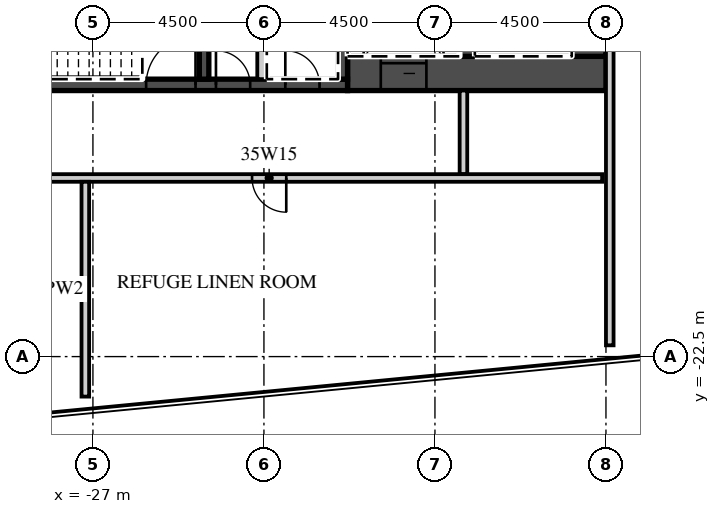
"""IFC4 building model, lengths in metres.
Left out: names, types, materials, properties, quantities, classifications, styles, units other than length and angle.
Written with IfcOpenShell. Run it as: python <this file> out.ifc"""

import sys

from ifc_helpers import new_model, si_unit, direction, frame, frame_2d, origin, place, context, subcontext, project, spatial, rectangle, extrude, element, fill, save


model = new_model("IFC4")
c1 = context("Model", 3, precision=1e-05, world=origin(), true_north=direction((0.0, 1.0)))
c2 = subcontext(c1, "Body", "Model", "MODEL_VIEW")
j1 = project(units=[si_unit("LENGTHUNIT", "METRE"), si_unit("PLANEANGLEUNIT", "RADIAN")], contexts=[c1])
p1 = place(None, origin())
s1 = spatial("IfcSite", under=j1, at=p1, CompositionType="ELEMENT")
p2 = place(p1, origin())
s2 = spatial("IfcBuilding", under=s1, at=p2, CompositionType="ELEMENT")
p3 = place(p2, frame((0.0, 0.0, 150.4)))
s3 = spatial("IfcBuildingStorey", under=s2, at=p3, CompositionType="ELEMENT", Elevation=150.4)
p4 = place(p3, frame((-20.3, -15.05, 0.0), z_axis=(0.0, 0.0, 1.0), x_axis=(1.0, 0.0, 0.0)))
e1 = element("IfcWall", 1, at=p4, inside=s3, PredefinedType="SHEAR", context=c2, shape_type="SweptSolid", body=[
    extrude(rectangle(XDim=6.8, YDim=0.9, at=frame_2d((3.4, 0.0))), origin(), (0.0, 0.0, 1.0), 4.2),
])
p5 = place(p4, frame((0.875, 0.0, 0.0)))
e2 = element("IfcOpeningElement", 2, at=p5, cuts=e1, PredefinedType="OPENING", context=c2, shape_type="SweptSolid", body=[
    extrude(rectangle(XDim=1.2, YDim=2.1, at=frame_2d((0.6, 1.05))), frame((0.0, 0.46, 0.0), z_axis=(0.0, -1.0, 0.0), x_axis=(1.0, 0.0, 0.0)), (0.0, 0.0, 1.0), 0.92),
])
p6 = place(p3, frame((-30.6, -15.35, 0.0), z_axis=(0.0, 0.0, 1.0), x_axis=(1.0, 0.0, 0.0)))
e3 = element("IfcWall", 3, at=p6, inside=s3, PredefinedType="SHEAR", context=c2, shape_type="SweptSolid", body=[
    extrude(rectangle(XDim=10.3, YDim=0.3, at=frame_2d((5.15, 0.0))), origin(), (0.0, 0.0, 1.0), 4.2),
])
p7 = place(p6, frame((5.0, 0.0, 0.0)))
e4 = element("IfcOpeningElement", 4, at=p7, cuts=e3, PredefinedType="OPENING", context=c2, shape_type="SweptSolid", body=[
    extrude(rectangle(XDim=1.3, YDim=2.1, at=frame_2d((0.65, 1.05))), frame((0.0, 0.16, 0.0), z_axis=(0.0, -1.0, 0.0), x_axis=(1.0, 0.0, 0.0)), (0.0, 0.0, 1.0), 0.32),
])
p8 = place(p6, frame((6.837, 0.0, 0.0)))
e5 = element("IfcOpeningElement", 5, at=p8, cuts=e3, PredefinedType="OPENING", context=c2, shape_type="SweptSolid", body=[
    extrude(rectangle(XDim=0.9, YDim=2.1, at=frame_2d((0.45, 1.05))), frame((0.0, 0.16, 0.0), z_axis=(0.0, -1.0, 0.0), x_axis=(1.0, 0.0, 0.0)), (0.0, 0.0, 1.0), 0.32),
])
p9 = place(p6, frame((8.663, 0.0, 0.0)))
e6 = element("IfcOpeningElement", 6, at=p9, cuts=e3, PredefinedType="OPENING", context=c2, shape_type="SweptSolid", body=[
    extrude(rectangle(XDim=0.9, YDim=2.1, at=frame_2d((0.45, 1.05))), frame((0.0, 0.16, 0.0), z_axis=(0.0, -1.0, 0.0), x_axis=(1.0, 0.0, 0.0)), (0.0, 0.0, 1.0), 0.32),
])
p10 = place(p3, frame((-13.95, -14.6, 0.0), z_axis=(0.0, 0.0, 1.0), x_axis=(0.0, 1.0, 0.0)))
e7 = element("IfcWall", 7, at=p10, inside=s3, PredefinedType="SHEAR", context=c2, shape_type="SweptSolid", body=[
    extrude(rectangle(XDim=12.2, YDim=0.9, at=frame_2d((6.1, 0.0))), origin(), (0.0, 0.0, 1.0), 4.2),
])
p11 = place(p3, frame((-17.15, -14.6, 0.0), z_axis=(0.0, 0.0, 1.0), x_axis=(0.0, 1.0, 0.0)))
e8 = element("IfcWall", 8, at=p11, inside=s3, PredefinedType="SHEAR", context=c2, shape_type="SweptSolid", body=[
    extrude(rectangle(XDim=5.8, YDim=0.4, at=frame_2d((2.9, 0.0))), origin(), (0.0, 0.0, 1.0), 4.2),
])
for number, where, z_axis, x_axis in (
    (9, (-20.425, -15.2, 0.0), (0.0, 0.0, 1.0), (0.0, 1.0, 0.0)),
    (10, (-24.075, -15.2, 0.0), (0.0, 0.0, 1.0), (0.0, 1.0, 0.0)),
):
    element("IfcWall", number, at=place(p3, frame(where, z_axis=z_axis, x_axis=x_axis)), inside=s3, PredefinedType="SHEAR", context=c2, shape_type="SweptSolid", body=[
        extrude(rectangle(XDim=3.25, YDim=0.25, at=frame_2d((1.625, 0.0))), origin(), (0.0, 0.0, 1.0), 4.2),
    ])
p12 = place(p3, frame((-22.55, -15.2, 0.0), z_axis=(0.0, 0.0, 1.0), x_axis=(0.0, 1.0, 0.0)))
e11 = element("IfcWall", 11, at=p12, inside=s3, PredefinedType="PARTITIONING", context=c2, shape_type="SweptSolid", body=[
    extrude(rectangle(XDim=3.25, YDim=0.25, at=frame_2d((1.625, 0.0))), origin(), (0.0, 0.0, 1.0), 4.2),
])
p13 = place(p3, frame((-17.25, -17.7, 0.0), z_axis=(0.0, 0.0, 1.0), x_axis=(0.0, 1.0, 0.0)))
e12 = element("IfcWall", 12, at=p13, inside=s3, PredefinedType="PARTITIONING", context=c2, shape_type="SweptSolid", body=[
    extrude(rectangle(XDim=2.2, YDim=0.2, at=frame_2d((1.1, 0.0))), origin(), (0.0, 0.0, 1.0), 4.2),
])
p14 = place(p3, frame((-37.477, -17.8, 0.0), z_axis=(0.0, 0.0, 1.0), x_axis=(1.0, 0.0, 0.0)))
e13 = element("IfcWall", 13, at=p14, inside=s3, PredefinedType="PARTITIONING", context=c2, shape_type="SweptSolid", body=[
    extrude(rectangle(XDim=23.877, YDim=0.2, at=frame_2d((11.938, 0.0))), origin(), (0.0, 0.0, 1.0), 4.2),
])
p15 = place(p14, frame((6.365, 0.0, 0.0)))
e14 = element("IfcOpeningElement", 14, at=p15, cuts=e13, PredefinedType="OPENING", context=c2, shape_type="SweptSolid", body=[
    extrude(rectangle(XDim=0.9, YDim=2.1, at=frame_2d((0.45, 1.05))), frame((0.0, 0.11, 0.0), z_axis=(0.0, -1.0, 0.0), x_axis=(1.0, 0.0, 0.0)), (0.0, 0.0, 1.0), 0.22),
])
p16 = place(p14, frame((14.665, 0.0, 0.0)))
e15 = element("IfcOpeningElement", 15, at=p16, cuts=e13, PredefinedType="OPENING", context=c2, shape_type="SweptSolid", body=[
    extrude(rectangle(XDim=0.9, YDim=2.1, at=frame_2d((0.45, 1.05))), frame((0.0, 0.11, 0.0), z_axis=(0.0, -1.0, 0.0), x_axis=(1.0, 0.0, 0.0)), (0.0, 0.0, 1.0), 0.22),
])
p17 = place(p3, frame((-27.2, -23.552, 0.0), z_axis=(0.0, 0.0, 1.0), x_axis=(0.0, 1.0, 0.0)))
e16 = element("IfcWall", 16, at=p17, inside=s3, PredefinedType="PARTITIONING", context=c2, shape_type="SweptSolid", body=[
    extrude(rectangle(XDim=5.653, YDim=0.2, at=frame_2d((2.826, 0.0))), origin(), (0.0, 0.0, 1.0), 4.2),
])
p18 = place(p3, frame((-13.4, -22.204, 0.0), z_axis=(0.0, 0.0, 1.0), x_axis=(0.0, 1.0, 0.0)))
e17 = element("IfcWall", 17, at=p18, inside=s3, PredefinedType="PARTITIONING", context=c2, shape_type="SweptSolid", body=[
    extrude(rectangle(XDim=20.604, YDim=0.2, at=frame_2d((10.302, 0.0))), origin(), (0.0, 0.0, 1.0), 4.2),
])
p19 = place(p5, origin())
e18 = element("IfcDoor", 18, at=p19, inside=s3, OperationType="SLIDING_TO_LEFT", PredefinedType="DOOR", context=c2, shape_type="SweptSolid", body=[
    extrude(rectangle(XDim=1.2, YDim=2.1, at=frame_2d((0.6, 1.05))), frame((0.0, 0.025, 0.0), z_axis=(0.0, -1.0, 0.0), x_axis=(1.0, 0.0, 0.0)), (0.0, 0.0, 1.0), 0.05),
])
fill(e2, e18)
p20 = place(p7, origin())
e19 = element("IfcDoor", 19, at=p20, inside=s3, OperationType="SINGLE_SWING_RIGHT", PredefinedType="DOOR", context=c2, shape_type="SweptSolid", body=[
    extrude(rectangle(XDim=1.3, YDim=2.1, at=frame_2d((0.65, 1.05))), frame((0.0, 0.025, 0.0), z_axis=(0.0, -1.0, 0.0), x_axis=(1.0, 0.0, 0.0)), (0.0, 0.0, 1.0), 0.05),
])
fill(e4, e19)
p21 = place(p8, origin())
e20 = element("IfcDoor", 20, at=p21, inside=s3, OperationType="SINGLE_SWING_LEFT", PredefinedType="DOOR", context=c2, shape_type="SweptSolid", body=[
    extrude(rectangle(XDim=0.9, YDim=2.1, at=frame_2d((0.45, 1.05))), frame((0.0, 0.025, 0.0), z_axis=(0.0, -1.0, 0.0), x_axis=(1.0, 0.0, 0.0)), (0.0, 0.0, 1.0), 0.05),
])
fill(e5, e20)
p22 = place(p9, origin())
e21 = element("IfcDoor", 21, at=p22, inside=s3, OperationType="SINGLE_SWING_LEFT", PredefinedType="DOOR", context=c2, shape_type="SweptSolid", body=[
    extrude(rectangle(XDim=0.9, YDim=2.1, at=frame_2d((0.45, 1.05))), frame((0.0, 0.025, 0.0), z_axis=(0.0, -1.0, 0.0), x_axis=(1.0, 0.0, 0.0)), (0.0, 0.0, 1.0), 0.05),
])
fill(e6, e21)
p23 = place(p16, origin())
e22 = element("IfcDoor", 22, at=p23, inside=s3, OperationType="SINGLE_SWING_RIGHT", PredefinedType="DOOR", context=c2, shape_type="SweptSolid", body=[
    extrude(rectangle(XDim=0.9, YDim=2.1, at=frame_2d((0.45, 1.05))), frame((0.0, 0.025, 0.0), z_axis=(0.0, -1.0, 0.0), x_axis=(1.0, 0.0, 0.0)), (0.0, 0.0, 1.0), 0.05),
])
fill(e15, e22)
save(model, sys.argv[1])
